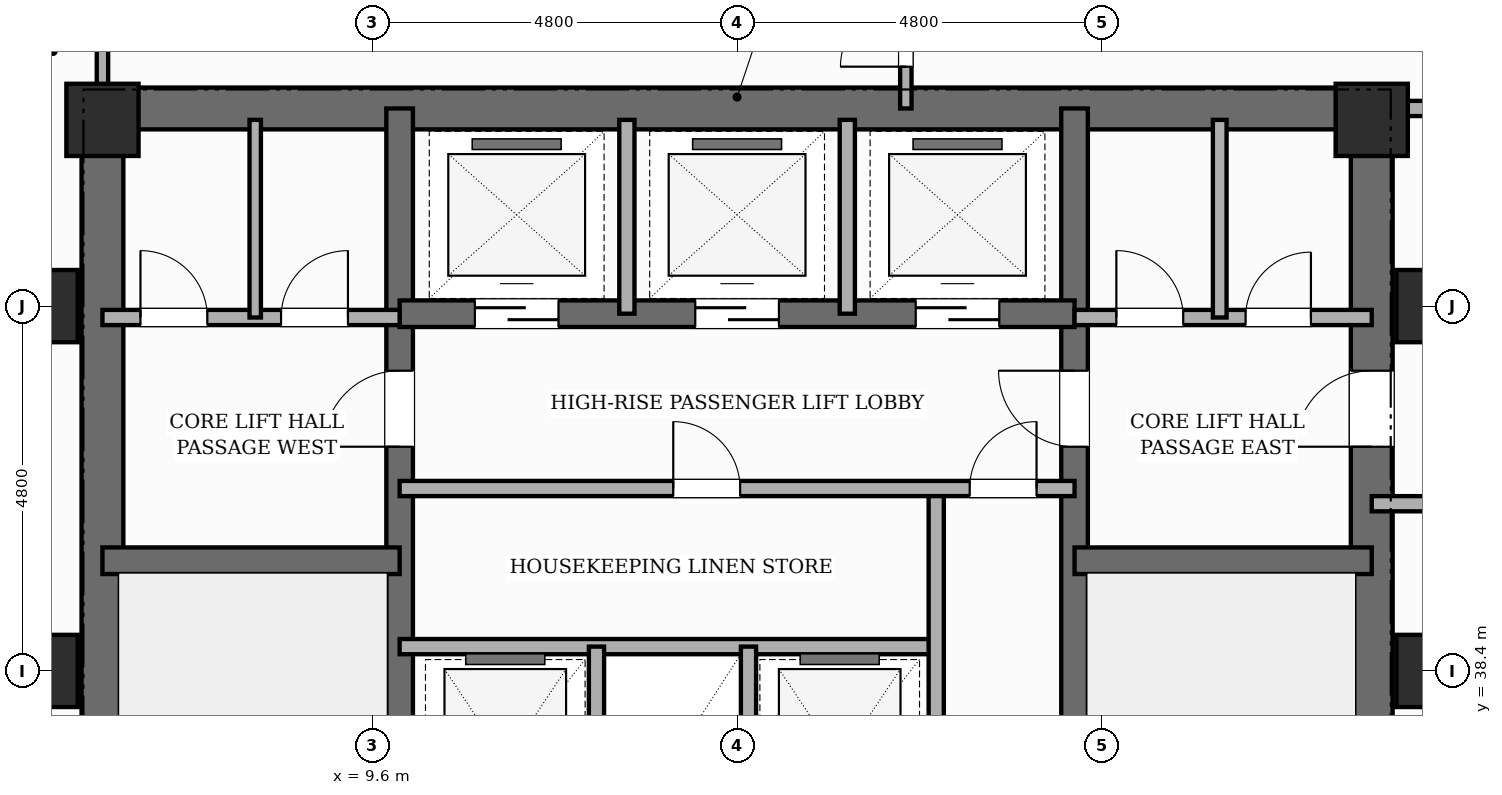
"""IFC4 building model, lengths in metres.
Left out: names, types, materials, properties, quantities, classifications, styles, units other than length and angle.
Written with IfcOpenShell. Run it as: python <this file> out.ifc"""

import sys

from ifc_helpers import new_model, si_unit, direction, frame, frame_2d, origin, origin_2d, place, context, subcontext, project, spatial, rectangle, extrude, element, fill, save


model = new_model("IFC4")
c1 = context("Model", 3, precision=1e-05, world=origin(), true_north=direction((0.0, 1.0)))
c2 = subcontext(c1, "Body", "Model", "MODEL_VIEW")
j1 = project(units=[si_unit("LENGTHUNIT", "METRE"), si_unit("PLANEANGLEUNIT", "RADIAN")], contexts=[c1])
p1 = place(None, origin())
s1 = spatial("IfcSite", under=j1, at=p1, CompositionType="ELEMENT")
p2 = place(p1, origin())
s2 = spatial("IfcBuilding", under=s1, at=p2, CompositionType="ELEMENT")
p3 = place(p2, frame((0.0, 0.0, 193.6)))
s3 = spatial("IfcBuildingStorey", under=s2, at=p3, CompositionType="ELEMENT", Elevation=193.6)
p4 = place(p3, frame((6.05, 30.625, 0.0), z_axis=(0.0, 0.0, 1.0), x_axis=(0.0, 1.0, 0.0)))
e1 = element("IfcWall", 1, at=p4, inside=s3, PredefinedType="SHEAR", context=c2, shape_type="SweptSolid", body=[
    extrude(rectangle(XDim=15.45, YDim=0.55, at=frame_2d((7.725, 0.0))), origin(), (0.0, 0.0, 1.0), 4.8),
])
p5 = place(p3, frame((22.75, 30.625, 0.0), z_axis=(0.0, 0.0, 1.0), x_axis=(0.0, 1.0, 0.0)))
e2 = element("IfcWall", 2, at=p5, inside=s3, PredefinedType="SHEAR", context=c2, shape_type="SweptSolid", body=[
    extrude(rectangle(XDim=15.45, YDim=0.55, at=frame_2d((7.725, 0.0))), origin(), (0.0, 0.0, 1.0), 4.8),
])
p6 = place(p5, frame((10.725, 0.0, 0.0)))
e3 = element("IfcOpeningElement", 3, at=p6, cuts=e2, PredefinedType="OPENING", context=c2, shape_type="SweptSolid", body=[
    extrude(rectangle(XDim=1.0, YDim=2.15, at=frame_2d((0.5, 1.075))), frame((0.0, 0.285, 0.0), z_axis=(0.0, -1.0, 0.0), x_axis=(1.0, 0.0, 0.0)), (0.0, 0.0, 1.0), 0.57),
])
p7 = place(p3, frame((6.05, 45.8, 0.0), z_axis=(0.0, 0.0, 1.0), x_axis=(1.0, 0.0, 0.0)))
e4 = element("IfcWall", 4, at=p7, inside=s3, PredefinedType="SHEAR", context=c2, shape_type="SweptSolid", body=[
    extrude(rectangle(XDim=16.7, YDim=0.55, at=frame_2d((8.35, 0.0))), origin(), (0.0, 0.0, 1.0), 4.8),
])
p8 = place(p3, frame((9.96, 30.9, 0.0), z_axis=(0.0, 0.0, 1.0), x_axis=(0.0, 1.0, 0.0)))
e5 = element("IfcWall", 5, at=p8, inside=s3, PredefinedType="SHEAR", context=c2, shape_type="SweptSolid", body=[
    extrude(rectangle(XDim=14.9, YDim=0.35, at=frame_2d((7.45, 0.0))), origin(), (0.0, 0.0, 1.0), 4.8),
])
p9 = place(p8, frame((0.65, 0.0, 0.0)))
e6 = element("IfcOpeningElement", 6, at=p9, cuts=e5, PredefinedType="OPENING", context=c2, shape_type="SweptSolid", body=[
    extrude(rectangle(XDim=0.95, YDim=2.1, at=frame_2d((0.475, 1.05))), frame((0.0, 0.185, 0.0), z_axis=(0.0, -1.0, 0.0), x_axis=(1.0, 0.0, 0.0)), (0.0, 0.0, 1.0), 0.37),
])
p10 = place(p8, frame((10.45, 0.0, 0.0)))
e7 = element("IfcOpeningElement", 7, at=p10, cuts=e5, PredefinedType="OPENING", context=c2, shape_type="SweptSolid", body=[
    extrude(rectangle(XDim=1.0, YDim=2.15, at=frame_2d((0.5, 1.075))), frame((0.0, 0.185, 0.0), z_axis=(0.0, -1.0, 0.0), x_axis=(1.0, 0.0, 0.0)), (0.0, 0.0, 1.0), 0.37),
])
p11 = place(p3, frame((18.84, 30.9, 0.0), z_axis=(0.0, 0.0, 1.0), x_axis=(0.0, 1.0, 0.0)))
e8 = element("IfcWall", 8, at=p11, inside=s3, PredefinedType="SHEAR", context=c2, shape_type="SweptSolid", body=[
    extrude(rectangle(XDim=14.9, YDim=0.35, at=frame_2d((7.45, 0.0))), origin(), (0.0, 0.0, 1.0), 4.8),
])
p12 = place(p11, frame((0.65, 0.0, 0.0)))
e9 = element("IfcOpeningElement", 9, at=p12, cuts=e8, PredefinedType="OPENING", context=c2, shape_type="SweptSolid", body=[
    extrude(rectangle(XDim=0.95, YDim=2.1, at=frame_2d((0.475, 1.05))), frame((0.0, 0.185, 0.0), z_axis=(0.0, -1.0, 0.0), x_axis=(1.0, 0.0, 0.0)), (0.0, 0.0, 1.0), 0.37),
])
p13 = place(p11, frame((10.45, 0.0, 0.0)))
e10 = element("IfcOpeningElement", 10, at=p13, cuts=e8, PredefinedType="OPENING", context=c2, shape_type="SweptSolid", body=[
    extrude(rectangle(XDim=1.0, YDim=2.15, at=frame_2d((0.5, 1.075))), frame((0.0, 0.185, 0.0), z_axis=(0.0, -1.0, 0.0), x_axis=(1.0, 0.0, 0.0)), (0.0, 0.0, 1.0), 0.37),
])
for number, where, z_axis, x_axis in (
    (11, (6.05, 39.85, 0.0), (0.0, 0.0, 1.0), (1.0, 0.0, 0.0)),
    (12, (18.84, 39.85, 0.0), (0.0, 0.0, 1.0), (1.0, 0.0, 0.0)),
):
    element("IfcWall", number, at=place(p3, frame(where, z_axis=z_axis, x_axis=x_axis)), inside=s3, PredefinedType="SHEAR", context=c2, shape_type="SweptSolid", body=[
        extrude(rectangle(XDim=3.91, YDim=0.35, at=frame_2d((1.955, 0.0))), origin(), (0.0, 0.0, 1.0), 4.8),
    ])
p14 = place(p3, frame((9.96, 43.1, 0.0), z_axis=(0.0, 0.0, 1.0), x_axis=(1.0, 0.0, 0.0)))
e13 = element("IfcWall", 13, at=p14, inside=s3, PredefinedType="SHEAR", context=c2, shape_type="SweptSolid", body=[
    extrude(rectangle(XDim=8.88, YDim=0.35, at=frame_2d((4.44, 0.0))), origin(), (0.0, 0.0, 1.0), 4.8),
])
p15 = place(p14, frame((0.99, 0.0, 0.0)))
e14 = element("IfcOpeningElement", 14, at=p15, cuts=e13, PredefinedType="OPENING", context=c2, shape_type="SweptSolid", body=[
    extrude(rectangle(XDim=1.1, YDim=2.15, at=frame_2d((0.55, 1.075))), frame((0.0, 0.185, 0.0), z_axis=(0.0, -1.0, 0.0), x_axis=(1.0, 0.0, 0.0)), (0.0, 0.0, 1.0), 0.37),
])
p16 = place(p14, frame((3.89, 0.0, 0.0)))
e15 = element("IfcOpeningElement", 15, at=p16, cuts=e13, PredefinedType="OPENING", context=c2, shape_type="SweptSolid", body=[
    extrude(rectangle(XDim=1.1, YDim=2.15, at=frame_2d((0.55, 1.075))), frame((0.0, 0.185, 0.0), z_axis=(0.0, -1.0, 0.0), x_axis=(1.0, 0.0, 0.0)), (0.0, 0.0, 1.0), 0.37),
])
p17 = place(p14, frame((6.79, 0.0, 0.0)))
e16 = element("IfcOpeningElement", 16, at=p17, cuts=e13, PredefinedType="OPENING", context=c2, shape_type="SweptSolid", body=[
    extrude(rectangle(XDim=1.1, YDim=2.15, at=frame_2d((0.55, 1.075))), frame((0.0, 0.185, 0.0), z_axis=(0.0, -1.0, 0.0), x_axis=(1.0, 0.0, 0.0)), (0.0, 0.0, 1.0), 0.37),
])
for number, where, z_axis, x_axis in (
    (17, (5.25, 38.4, 0.0), (0.0, 0.0, 1.0), (1.0, 0.0, 0.0)),
    (18, (5.25, 43.2, 0.0), (0.0, 0.0, 1.0), (1.0, 0.0, 0.0)),
    (19, (6.05, 45.65, 0.0), (0.0, 0.0, 1.0), (1.0, 0.0, 0.0)),
    (20, (22.75, 45.65, 0.0), (0.0, 0.0, 1.0), (1.0, 0.0, 0.0)),
    (21, (23.55, 38.4, 0.0), (0.0, 0.0, 1.0), (1.0, 0.0, 0.0)),
    (22, (23.55, 43.2, 0.0), (0.0, 0.0, 1.0), (1.0, 0.0, 0.0)),
):
    element("IfcColumn", number, at=place(p3, frame(where, z_axis=z_axis, x_axis=x_axis)), inside=s3, PredefinedType="COLUMN", context=c2, shape_type="SweptSolid", body=[
        extrude(rectangle(XDim=0.95, YDim=0.95, at=origin_2d()), origin(), (0.0, 0.0, 1.0), 4.8),
    ])
p18 = place(p3, frame((9.96, 38.72, 0.0), z_axis=(0.0, 0.0, 1.0), x_axis=(1.0, 0.0, 0.0)))
e23 = element("IfcWall", 23, at=p18, inside=s3, PredefinedType="POLYGONAL", context=c2, shape_type="SweptSolid", body=[
    extrude(rectangle(XDim=7.06, YDim=0.2, at=frame_2d((3.53, 0.0))), origin(), (0.0, 0.0, 1.0), 4.5),
])
for number, where, z_axis, x_axis in (
    (24, (12.55, 35.65, 0.0), (0.0, 0.0, 1.0), (0.0, 1.0, 0.0)),
    (25, (14.55, 35.65, 0.0), (0.0, 0.0, 1.0), (0.0, 1.0, 0.0)),
):
    element("IfcWall", number, at=place(p3, frame(where, z_axis=z_axis, x_axis=x_axis)), inside=s3, PredefinedType="POLYGONAL", context=c2, shape_type="SweptSolid", body=[
        extrude(rectangle(XDim=3.07, YDim=0.2, at=frame_2d((1.535, 0.0))), origin(), (0.0, 0.0, 1.0), 4.5),
    ])
p19 = place(p3, frame((17.02, 35.65, 0.0), z_axis=(0.0, 0.0, 1.0), x_axis=(0.0, 1.0, 0.0)))
e26 = element("IfcWall", 26, at=p19, inside=s3, PredefinedType="POLYGONAL", context=c2, shape_type="SweptSolid", body=[
    extrude(rectangle(XDim=5.15, YDim=0.2, at=frame_2d((2.575, 0.0))), origin(), (0.0, 0.0, 1.0), 4.5),
])
p20 = place(p3, frame((9.96, 40.8, 0.0), z_axis=(0.0, 0.0, 1.0), x_axis=(1.0, 0.0, 0.0)))
e27 = element("IfcWall", 27, at=p20, inside=s3, PredefinedType="POLYGONAL", context=c2, shape_type="SweptSolid", body=[
    extrude(rectangle(XDim=8.88, YDim=0.2, at=frame_2d((4.44, 0.0))), origin(), (0.0, 0.0, 1.0), 4.5),
])
p21 = place(p20, frame((7.5, 0.0, 0.0)))
e28 = element("IfcOpeningElement", 28, at=p21, cuts=e27, PredefinedType="OPENING", context=c2, shape_type="SweptSolid", body=[
    extrude(rectangle(XDim=0.88, YDim=2.1, at=frame_2d((0.44, 1.05))), frame((0.0, 0.11, 0.0), z_axis=(0.0, -1.0, 0.0), x_axis=(1.0, 0.0, 0.0)), (0.0, 0.0, 1.0), 0.22),
])
p22 = place(p20, frame((3.6, 0.0, 0.0)))
e29 = element("IfcOpeningElement", 29, at=p22, cuts=e27, PredefinedType="OPENING", context=c2, shape_type="SweptSolid", body=[
    extrude(rectangle(XDim=0.88, YDim=2.1, at=frame_2d((0.44, 1.05))), frame((0.0, 0.11, 0.0), z_axis=(0.0, -1.0, 0.0), x_axis=(1.0, 0.0, 0.0)), (0.0, 0.0, 1.0), 0.22),
])
p23 = place(p3, frame((18.84, 43.05, 0.0), z_axis=(0.0, 0.0, 1.0), x_axis=(1.0, 0.0, 0.0)))
e30 = element("IfcWall", 30, at=p23, inside=s3, PredefinedType="POLYGONAL", context=c2, shape_type="SweptSolid", body=[
    extrude(rectangle(XDim=3.91, YDim=0.2, at=frame_2d((1.955, 0.0))), origin(), (0.0, 0.0, 1.0), 3.78),
])
p24 = place(p23, frame((0.55, 0.0, 0.0)))
e31 = element("IfcOpeningElement", 31, at=p24, cuts=e30, PredefinedType="OPENING", context=c2, shape_type="SweptSolid", body=[
    extrude(rectangle(XDim=0.88, YDim=2.1, at=frame_2d((0.44, 1.05))), frame((0.0, 0.11, 0.0), z_axis=(0.0, -1.0, 0.0), x_axis=(1.0, 0.0, 0.0)), (0.0, 0.0, 1.0), 0.22),
])
p25 = place(p23, frame((2.25, 0.0, 0.0)))
e32 = element("IfcOpeningElement", 32, at=p25, cuts=e30, PredefinedType="OPENING", context=c2, shape_type="SweptSolid", body=[
    extrude(rectangle(XDim=0.86, YDim=2.1, at=frame_2d((0.43, 1.05))), frame((0.0, 0.11, 0.0), z_axis=(0.0, -1.0, 0.0), x_axis=(1.0, 0.0, 0.0)), (0.0, 0.0, 1.0), 0.22),
])
p26 = place(p3, frame((6.05, 43.05, 0.0), z_axis=(0.0, 0.0, 1.0), x_axis=(1.0, 0.0, 0.0)))
e33 = element("IfcWall", 33, at=p26, inside=s3, PredefinedType="POLYGONAL", context=c2, shape_type="SweptSolid", body=[
    extrude(rectangle(XDim=3.91, YDim=0.2, at=frame_2d((1.955, 0.0))), origin(), (0.0, 0.0, 1.0), 3.78),
])
p27 = place(p26, frame((0.5, 0.0, 0.0)))
e34 = element("IfcOpeningElement", 34, at=p27, cuts=e33, PredefinedType="OPENING", context=c2, shape_type="SweptSolid", body=[
    extrude(rectangle(XDim=0.88, YDim=2.1, at=frame_2d((0.44, 1.05))), frame((0.0, 0.11, 0.0), z_axis=(0.0, -1.0, 0.0), x_axis=(1.0, 0.0, 0.0)), (0.0, 0.0, 1.0), 0.22),
])
p28 = place(p26, frame((2.35, 0.0, 0.0)))
e35 = element("IfcOpeningElement", 35, at=p28, cuts=e33, PredefinedType="OPENING", context=c2, shape_type="SweptSolid", body=[
    extrude(rectangle(XDim=0.88, YDim=2.1, at=frame_2d((0.44, 1.05))), frame((0.0, 0.11, 0.0), z_axis=(0.0, -1.0, 0.0), x_axis=(1.0, 0.0, 0.0)), (0.0, 0.0, 1.0), 0.22),
])
for number, where, z_axis, x_axis in (
    (36, (12.95, 43.1, 0.0), (0.0, 0.0, 1.0), (0.0, 1.0, 0.0)),
    (37, (15.85, 43.1, 0.0), (0.0, 0.0, 1.0), (0.0, 1.0, 0.0)),
):
    element("IfcWall", number, at=place(p3, frame(where, z_axis=z_axis, x_axis=x_axis)), inside=s3, PredefinedType="POLYGONAL", context=c2, shape_type="SweptSolid", body=[
        extrude(rectangle(XDim=2.55, YDim=0.2, at=frame_2d((1.275, 0.0))), origin(), (0.0, 0.0, 1.0), 4.5),
    ])
p29 = place(p3, frame((8.06, 43.05, 0.0), z_axis=(0.0, 0.0, 1.0), x_axis=(0.0, 1.0, 0.0)))
e38 = element("IfcWall", 38, at=p29, inside=s3, PredefinedType="PARTITIONING", context=c2, shape_type="SweptSolid", body=[
    extrude(rectangle(XDim=2.6, YDim=0.15, at=frame_2d((1.3, 0.0))), origin(), (0.0, 0.0, 1.0), 4.5),
])
p30 = place(p3, frame((20.75, 43.05, 0.0), z_axis=(0.0, 0.0, 1.0), x_axis=(0.0, 1.0, 0.0)))
e39 = element("IfcWall", 39, at=p30, inside=s3, PredefinedType="PLUMBINGWALL", context=c2, shape_type="SweptSolid", body=[
    extrude(rectangle(XDim=2.6, YDim=0.18, at=frame_2d((1.3, 0.0))), origin(), (0.0, 0.0, 1.0), 4.5),
])
p31 = place(p3, frame((6.05, 45.8, 0.0), z_axis=(0.0, 0.0, 1.0), x_axis=(0.0, 1.0, 0.0)))
e40 = element("IfcWall", 40, at=p31, inside=s3, PredefinedType="PARTITIONING", context=c2, shape_type="SweptSolid", body=[
    extrude(rectangle(XDim=1.5, YDim=0.15, at=frame_2d((0.75, 0.0))), origin(), (0.0, 0.0, 1.0), 4.5),
])
p32 = place(p3, frame((16.62, 45.8, 0.0), z_axis=(0.0, 0.0, 1.0), x_axis=(0.0, 1.0, 0.0)))
e41 = element("IfcWall", 41, at=p32, inside=s3, PredefinedType="PARTITIONING", context=c2, shape_type="SweptSolid", body=[
    extrude(rectangle(XDim=1.92, YDim=0.15, at=frame_2d((0.96, 0.0))), origin(), (0.0, 0.0, 1.0), 4.5),
])
p33 = place(p32, frame((0.55, 0.0, 0.0)))
e42 = element("IfcOpeningElement", 42, at=p33, cuts=e41, PredefinedType="OPENING", context=c2, shape_type="SweptSolid", body=[
    extrude(rectangle(XDim=0.86, YDim=2.1, at=frame_2d((0.43, 1.05))), frame((0.0, 0.085, 0.0), z_axis=(0.0, -1.0, 0.0), x_axis=(1.0, 0.0, 0.0)), (0.0, 0.0, 1.0), 0.17),
])
p34 = place(p3, frame((22.75, 45.8, 0.0), z_axis=(0.0, 0.0, 1.0), x_axis=(1.0, 0.0, 0.0)))
e43 = element("IfcWall", 43, at=p34, inside=s3, PredefinedType="PARTITIONING", context=c2, shape_type="SweptSolid", body=[
    extrude(rectangle(XDim=2.75, YDim=0.2, at=frame_2d((1.375, 0.0))), origin(), (0.0, 0.0, 1.0), 4.5),
])
p35 = place(p3, frame((22.75, 40.6, 0.0), z_axis=(0.0, 0.0, 1.0), x_axis=(1.0, 0.0, 0.0)))
e44 = element("IfcWall", 44, at=p35, inside=s3, PredefinedType="PARTITIONING", context=c2, shape_type="SweptSolid", body=[
    extrude(rectangle(XDim=3.37, YDim=0.2, at=frame_2d((1.685, 0.0))), origin(), (0.0, 0.0, 1.0), 4.5),
])
p36 = place(p35, frame((0.88, 0.0, 0.0)))
e45 = element("IfcOpeningElement", 45, at=p36, cuts=e44, PredefinedType="OPENING", context=c2, shape_type="SweptSolid", body=[
    extrude(rectangle(XDim=0.86, YDim=2.1, at=frame_2d((0.43, 1.05))), frame((0.0, 0.11, 0.0), z_axis=(0.0, -1.0, 0.0), x_axis=(1.0, 0.0, 0.0)), (0.0, 0.0, 1.0), 0.22),
])
p37 = place(p21, origin())
e46 = element("IfcDoor", 46, at=p37, inside=s3, OperationType="SINGLE_SWING_RIGHT", PredefinedType="DOOR", context=c2, shape_type="SweptSolid", body=[
    extrude(rectangle(XDim=0.88, YDim=2.1, at=frame_2d((0.44, 1.05))), frame((0.0, 0.025, 0.0), z_axis=(0.0, -1.0, 0.0), x_axis=(1.0, 0.0, 0.0)), (0.0, 0.0, 1.0), 0.05),
])
fill(e28, e46)
p38 = place(p15, origin())
e47 = element("IfcDoor", 47, at=p38, inside=s3, OperationType="SLIDING_TO_LEFT", PredefinedType="DOOR", context=c2, shape_type="SweptSolid", body=[
    extrude(rectangle(XDim=1.1, YDim=2.15, at=frame_2d((0.55, 1.075))), frame((0.0, 0.025, 0.0), z_axis=(0.0, -1.0, 0.0), x_axis=(1.0, 0.0, 0.0)), (0.0, 0.0, 1.0), 0.05),
])
fill(e14, e47)
p39 = place(p16, origin())
e48 = element("IfcDoor", 48, at=p39, inside=s3, OperationType="SLIDING_TO_RIGHT", PredefinedType="DOOR", context=c2, shape_type="SweptSolid", body=[
    extrude(rectangle(XDim=1.1, YDim=2.15, at=frame_2d((0.55, 1.075))), frame((0.0, 0.025, 0.0), z_axis=(0.0, -1.0, 0.0), x_axis=(1.0, 0.0, 0.0)), (0.0, 0.0, 1.0), 0.05),
])
fill(e15, e48)
p40 = place(p17, origin())
e49 = element("IfcDoor", 49, at=p40, inside=s3, OperationType="SLIDING_TO_LEFT", PredefinedType="DOOR", context=c2, shape_type="SweptSolid", body=[
    extrude(rectangle(XDim=1.1, YDim=2.15, at=frame_2d((0.55, 1.075))), frame((0.0, 0.025, 0.0), z_axis=(0.0, -1.0, 0.0), x_axis=(1.0, 0.0, 0.0)), (0.0, 0.0, 1.0), 0.05),
])
fill(e16, e49)
p41 = place(p10, origin())
e50 = element("IfcDoor", 50, at=p41, inside=s3, OperationType="SINGLE_SWING_LEFT", PredefinedType="DOOR", context=c2, shape_type="SweptSolid", body=[
    extrude(rectangle(XDim=1.0, YDim=2.15, at=frame_2d((0.5, 1.075))), frame((0.0, 0.025, 0.0), z_axis=(0.0, -1.0, 0.0), x_axis=(1.0, 0.0, 0.0)), (0.0, 0.0, 1.0), 0.05),
])
fill(e7, e50)
p42 = place(p13, origin())
e51 = element("IfcDoor", 51, at=p42, inside=s3, OperationType="SINGLE_SWING_RIGHT", PredefinedType="DOOR", context=c2, shape_type="SweptSolid", body=[
    extrude(rectangle(XDim=1.0, YDim=2.15, at=frame_2d((0.5, 1.075))), frame((0.0, 0.025, 0.0), z_axis=(0.0, -1.0, 0.0), x_axis=(1.0, 0.0, 0.0)), (0.0, 0.0, 1.0), 0.05),
])
fill(e10, e51)
p43 = place(p6, origin())
e52 = element("IfcDoor", 52, at=p43, inside=s3, OperationType="SINGLE_SWING_LEFT", PredefinedType="DOOR", context=c2, shape_type="SweptSolid", body=[
    extrude(rectangle(XDim=1.0, YDim=2.15, at=frame_2d((0.5, 1.075))), frame((0.0, 0.025, 0.0), z_axis=(0.0, -1.0, 0.0), x_axis=(1.0, 0.0, 0.0)), (0.0, 0.0, 1.0), 0.05),
])
fill(e3, e52)
p44 = place(p27, origin())
e53 = element("IfcDoor", 53, at=p44, inside=s3, OperationType="SINGLE_SWING_LEFT", PredefinedType="DOOR", context=c2, shape_type="SweptSolid", body=[
    extrude(rectangle(XDim=0.88, YDim=2.1, at=frame_2d((0.44, 1.05))), frame((0.0, 0.025, 0.0), z_axis=(0.0, -1.0, 0.0), x_axis=(1.0, 0.0, 0.0)), (0.0, 0.0, 1.0), 0.05),
])
fill(e34, e53)
p45 = place(p28, origin())
e54 = element("IfcDoor", 54, at=p45, inside=s3, OperationType="SINGLE_SWING_RIGHT", PredefinedType="DOOR", context=c2, shape_type="SweptSolid", body=[
    extrude(rectangle(XDim=0.88, YDim=2.1, at=frame_2d((0.44, 1.05))), frame((0.0, 0.025, 0.0), z_axis=(0.0, -1.0, 0.0), x_axis=(1.0, 0.0, 0.0)), (0.0, 0.0, 1.0), 0.05),
])
fill(e35, e54)
p46 = place(p22, origin())
e55 = element("IfcDoor", 55, at=p46, inside=s3, OperationType="SINGLE_SWING_LEFT", PredefinedType="DOOR", context=c2, shape_type="SweptSolid", body=[
    extrude(rectangle(XDim=0.88, YDim=2.1, at=frame_2d((0.44, 1.05))), frame((0.0, 0.025, 0.0), z_axis=(0.0, -1.0, 0.0), x_axis=(1.0, 0.0, 0.0)), (0.0, 0.0, 1.0), 0.05),
])
fill(e29, e55)
p47 = place(p24, origin())
e56 = element("IfcDoor", 56, at=p47, inside=s3, OperationType="SINGLE_SWING_LEFT", PredefinedType="DOOR", context=c2, shape_type="SweptSolid", body=[
    extrude(rectangle(XDim=0.88, YDim=2.1, at=frame_2d((0.44, 1.05))), frame((0.0, 0.025, 0.0), z_axis=(0.0, -1.0, 0.0), x_axis=(1.0, 0.0, 0.0)), (0.0, 0.0, 1.0), 0.05),
])
fill(e31, e56)
p48 = place(p25, origin())
e57 = element("IfcDoor", 57, at=p48, inside=s3, OperationType="SINGLE_SWING_RIGHT", PredefinedType="DOOR", context=c2, shape_type="SweptSolid", body=[
    extrude(rectangle(XDim=0.86, YDim=2.1, at=frame_2d((0.43, 1.05))), frame((0.0, 0.025, 0.0), z_axis=(0.0, -1.0, 0.0), x_axis=(1.0, 0.0, 0.0)), (0.0, 0.0, 1.0), 0.05),
])
fill(e32, e57)
p49 = place(p33, origin())
e58 = element("IfcDoor", 58, at=p49, inside=s3, OperationType="SINGLE_SWING_LEFT", PredefinedType="DOOR", context=c2, shape_type="SweptSolid", body=[
    extrude(rectangle(XDim=0.86, YDim=2.1, at=frame_2d((0.43, 1.05))), frame((0.0, 0.025, 0.0), z_axis=(0.0, -1.0, 0.0), x_axis=(1.0, 0.0, 0.0)), (0.0, 0.0, 1.0), 0.05),
])
fill(e42, e58)
save(model, sys.argv[1])
